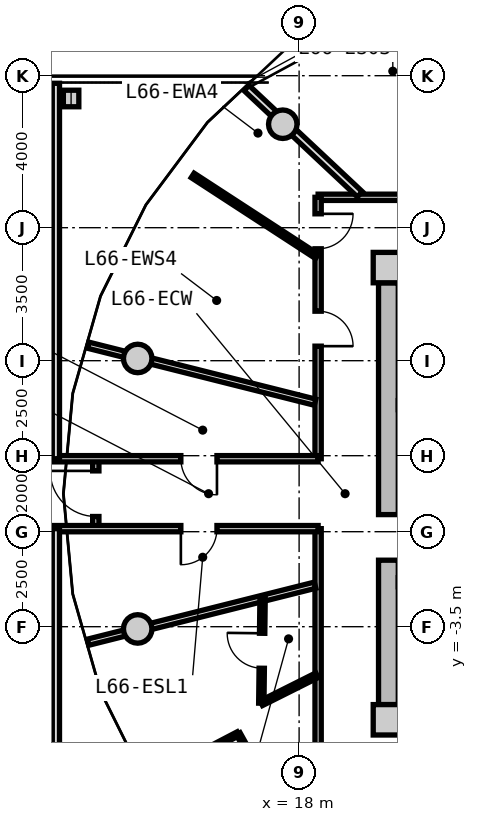
"""IFC4 building model, lengths in metres.
Left out: names, types, materials, properties, quantities, classifications, styles, units other than length and angle.
Written with IfcOpenShell. Run it as: python <this file> out.ifc"""

import sys

from ifc_helpers import new_model, si_unit, direction, frame, frame_2d, origin, origin_2d, place, context, subcontext, project, spatial, rectangle, circle, i_section, extrude, source, transform, mapped, element, fill, save


model = new_model("IFC4")
c1 = context("Model", 3, precision=1e-05, world=origin(), true_north=direction((0.0, 1.0)))
c2 = subcontext(c1, "Body", "Model", "MODEL_VIEW")
j1 = project(units=[si_unit("LENGTHUNIT", "METRE"), si_unit("PLANEANGLEUNIT", "RADIAN")], contexts=[c1])
p1 = place(None, origin())
s1 = spatial("IfcSite", under=j1, at=p1, CompositionType="ELEMENT")
p2 = place(p1, origin())
s2 = spatial("IfcBuilding", under=s1, at=p2, CompositionType="ELEMENT")
p3 = place(p2, frame((0.0, 0.0, 213.9)))
s3 = spatial("IfcBuildingStorey", under=s2, at=p3, CompositionType="ELEMENT", Elevation=213.9)
m1 = source(origin(), c2, "Body", "SweptSolid", [
    extrude(rectangle(XDim=0.8, YDim=0.8, at=origin_2d()), origin(), (0.0, 0.0, 1.0), 3.05),
])
for number, where, z_axis, x_axis in (
    (1, (20.35, -5.95, 0.0), (0.0, 0.0, 1.0), (1.0, 0.0, 0.0)),
    (2, (20.35, 5.95, 0.0), (0.0, 0.0, 1.0), (1.0, 0.0, 0.0)),
):
    element("IfcColumn", number, at=place(p3, frame(where, z_axis=z_axis, x_axis=x_axis)), inside=s3, PredefinedType="COLUMN", context=c2, shape_type="MappedRepresentation", body=[
        mapped(m1, transform((0.0, 0.0, 0.0), x_axis=(1.0, 0.0, 0.0), y_axis=(0.0, 1.0, 0.0), z_axis=(0.0, 0.0, 1.0), scale=1.0)),
    ])
m2 = source(origin(), c2, "Body", "SweptSolid", [
    extrude(rectangle(XDim=11.1, YDim=0.52, at=frame_2d((5.55, 0.0))), origin(), (0.0, 0.0, 1.0), 2.76),
])
p4 = place(p3, frame((20.35, -5.55, 0.0), z_axis=(0.0, 0.0, 1.0), x_axis=(0.0, 1.0, 0.0)))
e3 = element("IfcWall", 3, at=p4, inside=s3, PredefinedType="SHEAR", context=c2, shape_type="MappedRepresentation", body=[
    mapped(m2, transform((0.0, 0.0, 0.0), x_axis=(1.0, 0.0, 0.0), y_axis=(0.0, 1.0, 0.0), z_axis=(0.0, 0.0, 1.0), scale=1.0)),
])
p5 = place(p4, frame((3.8, 0.0, 0.0)))
e4 = element("IfcOpeningElement", 4, at=p5, cuts=e3, PredefinedType="OPENING", context=c2, shape_type="SweptSolid", body=[
    extrude(rectangle(XDim=1.2, YDim=2.15, at=frame_2d((0.6, 1.075))), frame((0.0, 0.27, 0.0), z_axis=(0.0, -1.0, 0.0), x_axis=(1.0, 0.0, 0.0)), (0.0, 0.0, 1.0), 0.54),
])
m3 = source(origin(), c2, "Body", "SweptSolid", [
    extrude(circle(Radius=0.375, at=origin_2d()), origin(), (0.0, 0.0, 1.0), 3.05),
])
for number, where, z_axis, x_axis in (
    (5, (17.57, 9.723, 0.0), (0.0, 0.0, 1.0), (1.0, 0.0, 0.0)),
    (6, (13.753, 3.559, 0.0), (0.0, 0.0, 1.0), (1.0, 0.0, 0.0)),
    (7, (13.753, -3.559, 0.0), (0.0, 0.0, 1.0), (1.0, 0.0, 0.0)),
):
    element("IfcColumn", number, at=place(p3, frame(where, z_axis=z_axis, x_axis=x_axis)), inside=s3, PredefinedType="COLUMN", context=c2, shape_type="MappedRepresentation", body=[
        mapped(m3, transform((0.0, 0.0, 0.0), x_axis=(1.0, 0.0, 0.0), y_axis=(0.0, 1.0, 0.0), z_axis=(0.0, 0.0, 1.0), scale=1.0)),
    ])
m4 = source(origin(), c2, "Body", "SweptSolid", [
    extrude(i_section(OverallWidth=0.407, OverallDepth=0.435, WebThickness=0.024, FlangeThickness=0.039, FilletRadius=0.015, at=origin_2d()), origin(), (0.0, 0.0, 1.0), 3.05),
])
p6 = place(p3, frame((12.0, 10.4, 0.0), z_axis=(0.0, 0.0, 1.0), x_axis=(1.0, 0.0, 0.0)))
e8 = element("IfcColumn", 8, at=p6, inside=s3, PredefinedType="COLUMN", context=c2, shape_type="MappedRepresentation", body=[
    mapped(m4, transform((0.0, 0.0, 0.0), x_axis=(1.0, 0.0, 0.0), y_axis=(0.0, 1.0, 0.0), z_axis=(0.0, 0.0, 1.0), scale=1.0)),
])
m5 = source(origin(), c2, "Body", "SweptSolid", [
    extrude(rectangle(XDim=8.58, YDim=0.165, at=frame_2d((4.29, 0.0))), origin(), (0.0, 0.0, 1.0), 2.745),
])
p7 = place(p3, frame((18.5, 7.8, 0.0), z_axis=(0.0, 0.0, 1.0), x_axis=(1.0, 0.0, 0.0)))
e9 = element("IfcWall", 9, at=p7, inside=s3, PredefinedType="PARTITIONING", context=c2, shape_type="MappedRepresentation", body=[
    mapped(m5, transform((0.0, 0.0, 0.0), x_axis=(1.0, 0.0, 0.0), y_axis=(0.0, 1.0, 0.0), z_axis=(0.0, 0.0, 1.0), scale=1.0)),
])
p8 = place(p7, frame((2.515, 0.0, 0.0)))
e10 = element("IfcOpeningElement", 10, at=p8, cuts=e9, PredefinedType="OPENING", context=c2, shape_type="SweptSolid", body=[
    extrude(rectangle(XDim=1.05, YDim=2.15, at=frame_2d((0.525, 1.075))), frame((0.0, 0.093, 0.0), z_axis=(0.0, -1.0, 0.0), x_axis=(1.0, 0.0, 0.0)), (0.0, 0.0, 1.0), 0.185),
])
m6 = source(origin(), c2, "Body", "SweptSolid", [
    extrude(rectangle(XDim=6.88, YDim=0.165, at=frame_2d((3.44, 0.0))), origin(), (0.0, 0.0, 1.0), 2.745),
])
p9 = place(p3, frame((18.5, -7.8, 0.0), z_axis=(0.0, 0.0, 1.0), x_axis=(0.0, 1.0, 0.0)))
e11 = element("IfcWall", 11, at=p9, inside=s3, PredefinedType="PARTITIONING", context=c2, shape_type="MappedRepresentation", body=[
    mapped(m6, transform((0.0, 0.0, 0.0), x_axis=(1.0, 0.0, 0.0), y_axis=(0.0, 1.0, 0.0), z_axis=(0.0, 0.0, 1.0), scale=1.0)),
])
p10 = place(p3, frame((18.5, 0.92, 0.0), z_axis=(0.0, 0.0, 1.0), x_axis=(0.0, 1.0, 0.0)))
e12 = element("IfcWall", 12, at=p10, inside=s3, PredefinedType="PARTITIONING", context=c2, shape_type="MappedRepresentation", body=[
    mapped(m6, transform((0.0, 0.0, 0.0), x_axis=(1.0, 0.0, 0.0), y_axis=(0.0, 1.0, 0.0), z_axis=(0.0, 0.0, 1.0), scale=1.0)),
])
p11 = place(p10, frame((5.525, 0.0, 0.0)))
e13 = element("IfcOpeningElement", 13, at=p11, cuts=e12, PredefinedType="OPENING", context=c2, shape_type="SweptSolid", body=[
    extrude(rectangle(XDim=0.92, YDim=2.1, at=frame_2d((0.46, 1.05))), frame((0.0, 0.093, 0.0), z_axis=(0.0, -1.0, 0.0), x_axis=(1.0, 0.0, 0.0)), (0.0, 0.0, 1.0), 0.185),
])
p12 = place(p10, frame((2.962, 0.0, 0.0)))
e14 = element("IfcOpeningElement", 14, at=p12, cuts=e12, PredefinedType="OPENING", context=c2, shape_type="SweptSolid", body=[
    extrude(rectangle(XDim=0.92, YDim=2.1, at=frame_2d((0.46, 1.05))), frame((0.0, 0.093, 0.0), z_axis=(0.0, -1.0, 0.0), x_axis=(1.0, 0.0, 0.0)), (0.0, 0.0, 1.0), 0.185),
])
m7 = source(origin(), c2, "Body", "SweptSolid", [
    extrude(rectangle(XDim=6.157, YDim=0.165, at=frame_2d((3.079, 0.0))), origin(), (0.0, 0.0, 1.0), 2.345),
])
for number, where, z_axis, x_axis in (
    (15, (18.42, 2.407, 0.0), (0.0, 0.0, 1.0), (-0.97, 0.244, 0.0)),
    (16, (18.42, -2.407, 0.0), (0.0, 0.0, 1.0), (-0.97, -0.244, 0.0)),
):
    element("IfcWall", number, at=place(p3, frame(where, z_axis=z_axis, x_axis=x_axis)), inside=s3, PredefinedType="PARTITIONING", context=c2, shape_type="MappedRepresentation", body=[
        mapped(m7, transform((0.0, 0.0, 0.0), x_axis=(1.0, 0.0, 0.0), y_axis=(0.0, 1.0, 0.0), z_axis=(0.0, 0.0, 1.0), scale=1.0)),
    ])
m8 = source(origin(), c2, "Body", "SweptSolid", [
    extrude(rectangle(XDim=4.089, YDim=0.19, at=frame_2d((2.044, 0.0))), origin(), (0.0, 0.0, 1.0), 2.345),
])
p13 = place(p3, frame((19.598, 7.88, 0.0), z_axis=(0.0, 0.0, 1.0), x_axis=(-0.729401273609, 0.684086092577, 0.0)))
e17 = element("IfcWall", 17, at=p13, inside=s3, PredefinedType="PARTITIONING", context=c2, shape_type="MappedRepresentation", body=[
    mapped(m8, transform((0.0, 0.0, 0.0), x_axis=(1.0, 0.0, 0.0), y_axis=(0.0, 1.0, 0.0), z_axis=(0.0, 0.0, 1.0), scale=1.0)),
])
m9 = source(origin(), c2, "Body", "SweptSolid", [
    extrude(rectangle(XDim=3.904, YDim=0.14, at=frame_2d((1.952, 0.0))), origin(), (0.0, 0.0, 1.0), 2.745),
])
p14 = place(p3, frame((18.47, 6.246, 0.0), z_axis=(0.0, 0.0, 1.0), x_axis=(-0.838024687996, 0.545632314209, 0.0)))
e18 = element("IfcWall", 18, at=p14, inside=s3, PredefinedType="PARTITIONING", context=c2, shape_type="MappedRepresentation", body=[
    mapped(m9, transform((0.0, 0.0, 0.0), x_axis=(1.0, 0.0, 0.0), y_axis=(0.0, 1.0, 0.0), z_axis=(0.0, 0.0, 1.0), scale=1.0)),
])
m10 = source(origin(), c2, "Body", "SweptSolid", [
    extrude(rectangle(XDim=1.638, YDim=0.14, at=frame_2d((0.819, 0.0))), origin(), (0.0, 0.0, 1.0), 2.745),
])
p15 = place(p3, frame((18.47, -4.778, 0.0), z_axis=(0.0, 0.0, 1.0), x_axis=(-0.893919977945, -0.448226586707, 0.0)))
e19 = element("IfcWall", 19, at=p15, inside=s3, PredefinedType="PARTITIONING", context=c2, shape_type="MappedRepresentation", body=[
    mapped(m10, transform((0.0, 0.0, 0.0), x_axis=(1.0, 0.0, 0.0), y_axis=(0.0, 1.0, 0.0), z_axis=(0.0, 0.0, 1.0), scale=1.0)),
])
m11 = source(origin(), c2, "Body", "SweptSolid", [
    extrude(rectangle(XDim=2.759, YDim=0.14, at=frame_2d((1.379, 0.0))), origin(), (0.0, 0.0, 1.0), 2.745),
])
p16 = place(p3, frame((17.005, -5.513, 0.0), z_axis=(0.0, 0.0, 1.0), x_axis=(0.01194710728, 0.999928630767, 0.0)))
e20 = element("IfcWall", 20, at=p16, inside=s3, PredefinedType="PARTITIONING", context=c2, shape_type="MappedRepresentation", body=[
    mapped(m11, transform((0.0, 0.0, 0.0), x_axis=(1.0, 0.0, 0.0), y_axis=(0.0, 1.0, 0.0), z_axis=(0.0, 0.0, 1.0), scale=1.0)),
])
p17 = place(p16, frame((0.919, 0.0, 0.0)))
e21 = element("IfcOpeningElement", 21, at=p17, cuts=e20, PredefinedType="OPENING", context=c2, shape_type="SweptSolid", body=[
    extrude(rectangle(XDim=0.92, YDim=2.1, at=frame_2d((0.46, 1.05))), frame((0.0, 0.08, 0.0), z_axis=(0.0, -1.0, 0.0), x_axis=(1.0, 0.0, 0.0)), (0.0, 0.0, 1.0), 0.16),
])
m12 = source(origin(), c2, "Body", "SweptSolid", [
    extrude(rectangle(XDim=2.104, YDim=0.115, at=frame_2d((1.052, 0.0))), origin(), (0.0, 0.0, 1.0), 2.745),
])
p18 = place(p3, frame((16.396, -6.317, 0.0), z_axis=(0.0, 0.0, 1.0), x_axis=(-0.886060817493, -0.463569010724, 0.0)))
e22 = element("IfcWall", 22, at=p18, inside=s3, PredefinedType="PARTITIONING", context=c2, shape_type="MappedRepresentation", body=[
    mapped(m12, transform((0.0, 0.0, 0.0), x_axis=(1.0, 0.0, 0.0), y_axis=(0.0, 1.0, 0.0), z_axis=(0.0, 0.0, 1.0), scale=1.0)),
])
m13 = source(origin(), c2, "Body", "SweptSolid", [
    extrude(rectangle(XDim=3.472, YDim=0.115, at=frame_2d((1.736, 0.0))), origin(), (0.0, 0.0, 1.0), 2.745),
])
p19 = place(p3, frame((16.396, -6.317, 0.0), z_axis=(0.0, 0.0, 1.0), x_axis=(0.485804139346, -0.874067696574, 0.0)))
e23 = element("IfcWall", 23, at=p19, inside=s3, PredefinedType="PARTITIONING", context=c2, shape_type="MappedRepresentation", body=[
    mapped(m13, transform((0.0, 0.0, 0.0), x_axis=(1.0, 0.0, 0.0), y_axis=(0.0, 1.0, 0.0), z_axis=(0.0, 0.0, 1.0), scale=1.0)),
])
p20 = place(p19, frame((1.261, 0.0, 0.0)))
e24 = element("IfcOpeningElement", 24, at=p20, cuts=e23, PredefinedType="OPENING", context=c2, shape_type="SweptSolid", body=[
    extrude(rectangle(XDim=0.95, YDim=2.1, at=frame_2d((0.475, 1.05))), frame((0.0, 0.067, 0.0), z_axis=(0.0, -1.0, 0.0), x_axis=(1.0, 0.0, 0.0)), (0.0, 0.0, 1.0), 0.135),
])
m14 = source(origin(), c2, "Body", "SweptSolid", [
    extrude(rectangle(XDim=1.84, YDim=0.165, at=frame_2d((0.92, 0.0))), origin(), (0.0, 0.0, 1.0), 2.745),
])
p21 = place(p3, frame((12.65, -0.92, 0.0), z_axis=(0.0, 0.0, 1.0), x_axis=(0.0, 1.0, 0.0)))
e25 = element("IfcWall", 25, at=p21, inside=s3, PredefinedType="PARTITIONING", context=c2, shape_type="MappedRepresentation", body=[
    mapped(m14, transform((0.0, 0.0, 0.0), x_axis=(1.0, 0.0, 0.0), y_axis=(0.0, 1.0, 0.0), z_axis=(0.0, 0.0, 1.0), scale=1.0)),
])
p22 = place(p21, frame((0.32, 0.0, 0.0)))
e26 = element("IfcOpeningElement", 26, at=p22, cuts=e25, PredefinedType="OPENING", context=c2, shape_type="SweptSolid", body=[
    extrude(rectangle(XDim=1.2, YDim=2.15, at=frame_2d((0.6, 1.075))), frame((0.0, 0.093, 0.0), z_axis=(0.0, -1.0, 0.0), x_axis=(1.0, 0.0, 0.0)), (0.0, 0.0, 1.0), 0.185),
])
m15 = source(origin(), c2, "Body", "SweptSolid", [
    extrude(rectangle(XDim=37.0, YDim=0.165, at=frame_2d((18.5, 0.0))), origin(), (0.0, 0.0, 1.0), 2.745),
])
p23 = place(p3, frame((-18.5, -0.92, 0.0), z_axis=(0.0, 0.0, 1.0), x_axis=(1.0, 0.0, 0.0)))
e27 = element("IfcWall", 27, at=p23, inside=s3, PredefinedType="PARTITIONING", context=c2, shape_type="MappedRepresentation", body=[
    mapped(m15, transform((0.0, 0.0, 0.0), x_axis=(1.0, 0.0, 0.0), y_axis=(0.0, 1.0, 0.0), z_axis=(0.0, 0.0, 1.0), scale=1.0)),
])
p24 = place(p23, frame((2.662, 0.0, 0.0)))
e28 = element("IfcOpeningElement", 28, at=p24, cuts=e27, PredefinedType="OPENING", context=c2, shape_type="SweptSolid", body=[
    extrude(rectangle(XDim=0.95, YDim=2.1, at=frame_2d((0.475, 1.05))), frame((0.0, 0.093, 0.0), z_axis=(0.0, -1.0, 0.0), x_axis=(1.0, 0.0, 0.0)), (0.0, 0.0, 1.0), 0.185),
])
p25 = place(p23, frame((33.388, 0.0, 0.0)))
e29 = element("IfcOpeningElement", 29, at=p25, cuts=e27, PredefinedType="OPENING", context=c2, shape_type="SweptSolid", body=[
    extrude(rectangle(XDim=0.95, YDim=2.1, at=frame_2d((0.475, 1.05))), frame((0.0, 0.093, 0.0), z_axis=(0.0, -1.0, 0.0), x_axis=(1.0, 0.0, 0.0)), (0.0, 0.0, 1.0), 0.185),
])
p26 = place(p23, frame((9.075, 0.0, 0.0)))
e30 = element("IfcOpeningElement", 30, at=p26, cuts=e27, PredefinedType="OPENING", context=c2, shape_type="SweptSolid", body=[
    extrude(rectangle(XDim=1.25, YDim=2.2, at=frame_2d((0.625, 1.1))), frame((0.0, 0.093, 0.0), z_axis=(0.0, -1.0, 0.0), x_axis=(1.0, 0.0, 0.0)), (0.0, 0.0, 1.0), 0.185),
])
p27 = place(p23, frame((14.875, 0.0, 0.0)))
e31 = element("IfcOpeningElement", 31, at=p27, cuts=e27, PredefinedType="OPENING", context=c2, shape_type="SweptSolid", body=[
    extrude(rectangle(XDim=1.25, YDim=2.2, at=frame_2d((0.625, 1.1))), frame((0.0, 0.093, 0.0), z_axis=(0.0, -1.0, 0.0), x_axis=(1.0, 0.0, 0.0)), (0.0, 0.0, 1.0), 0.185),
])
p28 = place(p23, frame((20.875, 0.0, 0.0)))
e32 = element("IfcOpeningElement", 32, at=p28, cuts=e27, PredefinedType="OPENING", context=c2, shape_type="SweptSolid", body=[
    extrude(rectangle(XDim=1.25, YDim=2.2, at=frame_2d((0.625, 1.1))), frame((0.0, 0.093, 0.0), z_axis=(0.0, -1.0, 0.0), x_axis=(1.0, 0.0, 0.0)), (0.0, 0.0, 1.0), 0.185),
])
p29 = place(p23, frame((26.675, 0.0, 0.0)))
e33 = element("IfcOpeningElement", 33, at=p29, cuts=e27, PredefinedType="OPENING", context=c2, shape_type="SweptSolid", body=[
    extrude(rectangle(XDim=1.25, YDim=2.2, at=frame_2d((0.625, 1.1))), frame((0.0, 0.093, 0.0), z_axis=(0.0, -1.0, 0.0), x_axis=(1.0, 0.0, 0.0)), (0.0, 0.0, 1.0), 0.185),
])
p30 = place(p3, frame((-18.5, 0.92, 0.0), z_axis=(0.0, 0.0, 1.0), x_axis=(1.0, 0.0, 0.0)))
e34 = element("IfcWall", 34, at=p30, inside=s3, PredefinedType="PARTITIONING", context=c2, shape_type="MappedRepresentation", body=[
    mapped(m15, transform((0.0, 0.0, 0.0), x_axis=(1.0, 0.0, 0.0), y_axis=(0.0, 1.0, 0.0), z_axis=(0.0, 0.0, 1.0), scale=1.0)),
])
p31 = place(p30, frame((2.662, 0.0, 0.0)))
e35 = element("IfcOpeningElement", 35, at=p31, cuts=e34, PredefinedType="OPENING", context=c2, shape_type="SweptSolid", body=[
    extrude(rectangle(XDim=0.95, YDim=2.1, at=frame_2d((0.475, 1.05))), frame((0.0, 0.093, 0.0), z_axis=(0.0, -1.0, 0.0), x_axis=(1.0, 0.0, 0.0)), (0.0, 0.0, 1.0), 0.185),
])
p32 = place(p30, frame((33.388, 0.0, 0.0)))
e36 = element("IfcOpeningElement", 36, at=p32, cuts=e34, PredefinedType="OPENING", context=c2, shape_type="SweptSolid", body=[
    extrude(rectangle(XDim=0.95, YDim=2.1, at=frame_2d((0.475, 1.05))), frame((0.0, 0.093, 0.0), z_axis=(0.0, -1.0, 0.0), x_axis=(1.0, 0.0, 0.0)), (0.0, 0.0, 1.0), 0.185),
])
p33 = place(p30, frame((7.64, 0.0, 0.0)))
e37 = element("IfcOpeningElement", 37, at=p33, cuts=e34, PredefinedType="OPENING", context=c2, shape_type="SweptSolid", body=[
    extrude(rectangle(XDim=0.92, YDim=2.1, at=frame_2d((0.46, 1.05))), frame((0.0, 0.093, 0.0), z_axis=(0.0, -1.0, 0.0), x_axis=(1.0, 0.0, 0.0)), (0.0, 0.0, 1.0), 0.185),
])
p34 = place(p30, frame((10.275, 0.0, 0.0)))
e38 = element("IfcOpeningElement", 38, at=p34, cuts=e34, PredefinedType="OPENING", context=c2, shape_type="SweptSolid", body=[
    extrude(rectangle(XDim=1.25, YDim=2.2, at=frame_2d((0.625, 1.1))), frame((0.0, 0.093, 0.0), z_axis=(0.0, -1.0, 0.0), x_axis=(1.0, 0.0, 0.0)), (0.0, 0.0, 1.0), 0.185),
])
p35 = place(p30, frame((14.875, 0.0, 0.0)))
e39 = element("IfcOpeningElement", 39, at=p35, cuts=e34, PredefinedType="OPENING", context=c2, shape_type="SweptSolid", body=[
    extrude(rectangle(XDim=1.25, YDim=2.2, at=frame_2d((0.625, 1.1))), frame((0.0, 0.093, 0.0), z_axis=(0.0, -1.0, 0.0), x_axis=(1.0, 0.0, 0.0)), (0.0, 0.0, 1.0), 0.185),
])
p36 = place(p30, frame((20.875, 0.0, 0.0)))
e40 = element("IfcOpeningElement", 40, at=p36, cuts=e34, PredefinedType="OPENING", context=c2, shape_type="SweptSolid", body=[
    extrude(rectangle(XDim=1.25, YDim=2.2, at=frame_2d((0.625, 1.1))), frame((0.0, 0.093, 0.0), z_axis=(0.0, -1.0, 0.0), x_axis=(1.0, 0.0, 0.0)), (0.0, 0.0, 1.0), 0.185),
])
p37 = place(p30, frame((26.675, 0.0, 0.0)))
e41 = element("IfcOpeningElement", 41, at=p37, cuts=e34, PredefinedType="OPENING", context=c2, shape_type="SweptSolid", body=[
    extrude(rectangle(XDim=1.25, YDim=2.2, at=frame_2d((0.625, 1.1))), frame((0.0, 0.093, 0.0), z_axis=(0.0, -1.0, 0.0), x_axis=(1.0, 0.0, 0.0)), (0.0, 0.0, 1.0), 0.185),
])
m16 = source(origin(), c2, "Body", "SweptSolid", [
    extrude(rectangle(XDim=9.88, YDim=0.19, at=frame_2d((4.94, 0.0))), origin(), (0.0, 0.0, 1.0), 2.745),
])
for number, where, z_axis, x_axis in (
    (42, (11.6, -10.8, 0.0), (0.0, 0.0, 1.0), (0.0, 1.0, 0.0)),
    (43, (11.6, 0.92, 0.0), (0.0, 0.0, 1.0), (0.0, 1.0, 0.0)),
):
    element("IfcWall", number, at=place(p3, frame(where, z_axis=z_axis, x_axis=x_axis)), inside=s3, PredefinedType="PARTITIONING", context=c2, shape_type="MappedRepresentation", body=[
        mapped(m16, transform((0.0, 0.0, 0.0), x_axis=(1.0, 0.0, 0.0), y_axis=(0.0, 1.0, 0.0), z_axis=(0.0, 0.0, 1.0), scale=1.0)),
    ])
m17 = source(origin(), c2, "Body", "SweptSolid", [
    extrude(rectangle(XDim=1.2, YDim=2.15, at=frame_2d((0.6, 1.075))), frame((0.0, 0.025, 0.0), z_axis=(0.0, -1.0, 0.0), x_axis=(1.0, 0.0, 0.0)), (0.0, 0.0, 1.0), 0.05),
])
p38 = place(p5, frame((1.2, 0.0, 0.0), z_axis=(0.0, 0.0, 1.0), x_axis=(-1.0, 0.0, 0.0)))
e44 = element("IfcDoor", 44, at=p38, inside=s3, OperationType="SINGLE_SWING_LEFT", PredefinedType="DOOR", context=c2, shape_type="MappedRepresentation", body=[
    mapped(m17, transform((0.0, 0.0, 0.0), x_axis=(1.0, 0.0, 0.0), y_axis=(0.0, 1.0, 0.0), z_axis=(0.0, 0.0, 1.0), scale=1.0)),
])
fill(e4, e44)
m18 = source(origin(), c2, "Body", "SweptSolid", [
    extrude(rectangle(XDim=0.95, YDim=2.1, at=frame_2d((0.475, 1.05))), frame((0.0, 0.025, 0.0), z_axis=(0.0, -1.0, 0.0), x_axis=(1.0, 0.0, 0.0)), (0.0, 0.0, 1.0), 0.05),
])
p39 = place(p25, frame((0.95, 0.0, 0.0), z_axis=(0.0, 0.0, 1.0), x_axis=(-1.0, 0.0, 0.0)))
e45 = element("IfcDoor", 45, at=p39, inside=s3, OperationType="SINGLE_SWING_RIGHT", PredefinedType="DOOR", context=c2, shape_type="MappedRepresentation", body=[
    mapped(m18, transform((0.0, 0.0, 0.0), x_axis=(1.0, 0.0, 0.0), y_axis=(0.0, 1.0, 0.0), z_axis=(0.0, 0.0, 1.0), scale=1.0)),
])
fill(e29, e45)
p40 = place(p32, frame((0.95, 0.0, 0.0), z_axis=(0.0, 0.0, 1.0), x_axis=(-1.0, 0.0, 0.0)))
e46 = element("IfcDoor", 46, at=p40, inside=s3, OperationType="SINGLE_SWING_LEFT", PredefinedType="DOOR", context=c2, shape_type="MappedRepresentation", body=[
    mapped(m18, transform((0.0, 0.0, 0.0), x_axis=(1.0, 0.0, 0.0), y_axis=(0.0, 1.0, 0.0), z_axis=(0.0, 0.0, 1.0), scale=1.0)),
])
fill(e36, e46)
m19 = source(origin(), c2, "Body", "SweptSolid", [
    extrude(rectangle(XDim=0.92, YDim=2.1, at=frame_2d((0.46, 1.05))), frame((0.0, 0.025, 0.0), z_axis=(0.0, -1.0, 0.0), x_axis=(1.0, 0.0, 0.0)), (0.0, 0.0, 1.0), 0.05),
])
p41 = place(p11, frame((0.92, 0.0, 0.0), z_axis=(0.0, 0.0, 1.0), x_axis=(-1.0, 0.0, 0.0)))
e47 = element("IfcDoor", 47, at=p41, inside=s3, OperationType="SINGLE_SWING_LEFT", PredefinedType="DOOR", context=c2, shape_type="MappedRepresentation", body=[
    mapped(m19, transform((0.0, 0.0, 0.0), x_axis=(1.0, 0.0, 0.0), y_axis=(0.0, 1.0, 0.0), z_axis=(0.0, 0.0, 1.0), scale=1.0)),
])
fill(e13, e47)
p42 = place(p12, frame((0.92, 0.0, 0.0), z_axis=(0.0, 0.0, 1.0), x_axis=(-1.0, 0.0, 0.0)))
e48 = element("IfcDoor", 48, at=p42, inside=s3, OperationType="SINGLE_SWING_RIGHT", PredefinedType="DOOR", context=c2, shape_type="MappedRepresentation", body=[
    mapped(m19, transform((0.0, 0.0, 0.0), x_axis=(1.0, 0.0, 0.0), y_axis=(0.0, 1.0, 0.0), z_axis=(0.0, 0.0, 1.0), scale=1.0)),
])
fill(e14, e48)
p43 = place(p17, origin())
e49 = element("IfcDoor", 49, at=p43, inside=s3, OperationType="SINGLE_SWING_RIGHT", PredefinedType="DOOR", context=c2, shape_type="MappedRepresentation", body=[
    mapped(m19, transform((0.0, 0.0, 0.0), x_axis=(1.0, 0.0, 0.0), y_axis=(0.0, 1.0, 0.0), z_axis=(0.0, 0.0, 1.0), scale=1.0)),
])
fill(e21, e49)
p44 = place(p22, origin())
e50 = element("IfcDoor", 50, at=p44, inside=s3, OperationType="SINGLE_SWING_RIGHT", PredefinedType="DOOR", context=c2, shape_type="MappedRepresentation", body=[
    mapped(m17, transform((0.0, 0.0, 0.0), x_axis=(1.0, 0.0, 0.0), y_axis=(0.0, 1.0, 0.0), z_axis=(0.0, 0.0, 1.0), scale=1.0)),
])
fill(e26, e50)
save(model, sys.argv[1])
